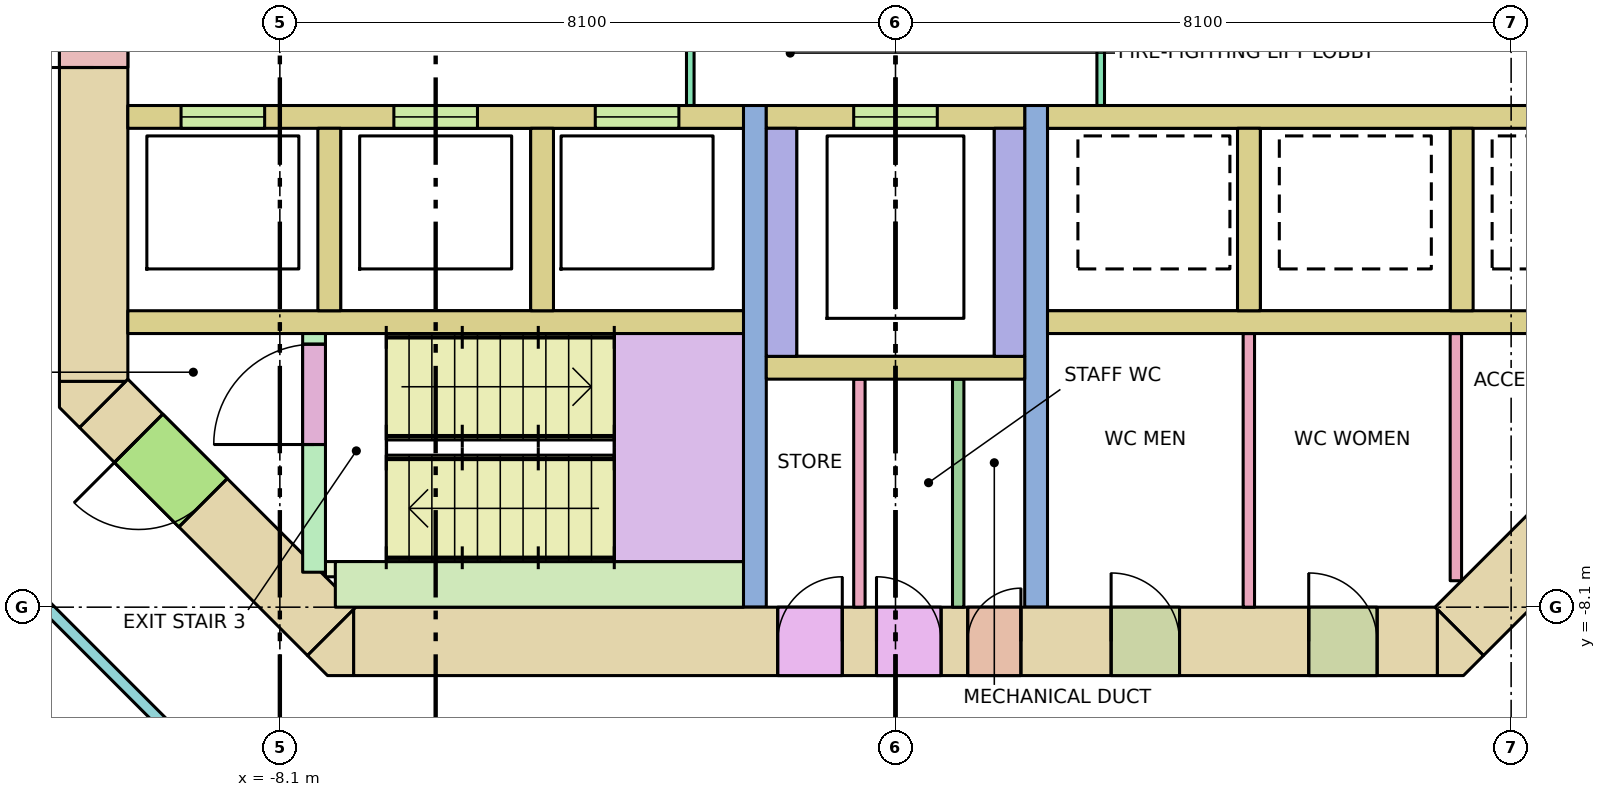
"""IFC4 building model, lengths in metres.
Left out: names, types, materials, properties, quantities, classifications, styles, units other than length and angle.
Written with IfcOpenShell. Run it as: python <this file> out.ifc"""

import sys

from ifc_helpers import new_model, si_unit, direction, frame, frame_2d, origin, place, context, subcontext, project, spatial, polyline, rectangle, outline, extrude, element, fill, save


model = new_model("IFC4")
c1 = context("Model", 3, precision=1e-05, world=origin(), true_north=direction((0.0, 1.0)))
c2 = subcontext(c1, "Body", "Model", "MODEL_VIEW")
j1 = project(units=[si_unit("LENGTHUNIT", "METRE"), si_unit("PLANEANGLEUNIT", "RADIAN")], contexts=[c1])
p1 = place(None, origin())
s1 = spatial("IfcSite", under=j1, at=p1, CompositionType="ELEMENT")
p2 = place(p1, origin())
s2 = spatial("IfcBuilding", under=s1, at=p2, CompositionType="ELEMENT")
p3 = place(p2, frame((0.0, 0.0, 116.2)))
s3 = spatial("IfcBuildingStorey", under=s2, at=p3, CompositionType="ELEMENT", Elevation=116.2)
p4 = place(p3, frame((-7.13, -8.55, -0.28), z_axis=(0.0, 0.0, 1.0), x_axis=(1.0, 0.0, 0.0)))
e1 = element("IfcWall", 1, at=p4, inside=s3, PredefinedType="SHEAR", context=c2, shape_type="SweptSolid", body=[
    extrude(rectangle(XDim=14.26, YDim=0.9, at=frame_2d((7.13, 0.0))), origin(), (0.0, 0.0, 1.0), 3.8),
])
p5 = place(p4, frame((8.08, 0.0, 0.28)))
e2 = element("IfcOpeningElement", 2, at=p5, cuts=e1, PredefinedType="OPENING", context=c2, shape_type="SweptSolid", body=[
    extrude(rectangle(XDim=0.7, YDim=2.1, at=frame_2d((0.35, 1.05))), frame((0.0, 0.46, 0.0), z_axis=(0.0, -1.0, 0.0), x_axis=(1.0, 0.0, 0.0)), (0.0, 0.0, 1.0), 0.92),
])
p6 = place(p4, frame((5.58, 0.0, 0.28)))
e3 = element("IfcOpeningElement", 3, at=p6, cuts=e1, PredefinedType="OPENING", context=c2, shape_type="SweptSolid", body=[
    extrude(rectangle(XDim=0.85, YDim=2.1, at=frame_2d((0.425, 1.05))), frame((0.0, 0.46, 0.0), z_axis=(0.0, -1.0, 0.0), x_axis=(1.0, 0.0, 0.0)), (0.0, 0.0, 1.0), 0.92),
])
p7 = place(p4, frame((6.88, 0.0, 0.28)))
e4 = element("IfcOpeningElement", 4, at=p7, cuts=e1, PredefinedType="OPENING", context=c2, shape_type="SweptSolid", body=[
    extrude(rectangle(XDim=0.85, YDim=2.1, at=frame_2d((0.425, 1.05))), frame((0.0, 0.46, 0.0), z_axis=(0.0, -1.0, 0.0), x_axis=(1.0, 0.0, 0.0)), (0.0, 0.0, 1.0), 0.92),
])
p8 = place(p4, frame((9.967, 0.0, 0.28)))
e5 = element("IfcOpeningElement", 5, at=p8, cuts=e1, PredefinedType="OPENING", context=c2, shape_type="SweptSolid", body=[
    extrude(rectangle(XDim=0.9, YDim=2.1, at=frame_2d((0.45, 1.05))), frame((0.0, 0.46, 0.0), z_axis=(0.0, -1.0, 0.0), x_axis=(1.0, 0.0, 0.0)), (0.0, 0.0, 1.0), 0.92),
])
p9 = place(p4, frame((12.567, 0.0, 0.28)))
e6 = element("IfcOpeningElement", 6, at=p9, cuts=e1, PredefinedType="OPENING", context=c2, shape_type="SweptSolid", body=[
    extrude(rectangle(XDim=0.9, YDim=2.1, at=frame_2d((0.45, 1.05))), frame((0.0, 0.46, 0.0), z_axis=(0.0, -1.0, 0.0), x_axis=(1.0, 0.0, 0.0)), (0.0, 0.0, 1.0), 0.92),
])
p10 = place(p3, frame((-10.55, -5.13, -0.28), z_axis=(0.0, 0.0, 1.0), x_axis=(0.0, 1.0, 0.0)))
e7 = element("IfcWall", 7, at=p10, inside=s3, PredefinedType="SHEAR", context=c2, shape_type="SweptSolid", body=[
    extrude(rectangle(XDim=10.26, YDim=0.9, at=frame_2d((5.13, 0.0))), origin(), (0.0, 0.0, 1.0), 3.8),
])
p11 = place(p10, frame((4.13, 0.0, 0.28)))
e8 = element("IfcOpeningElement", 8, at=p11, cuts=e7, PredefinedType="OPENING", context=c2, shape_type="SweptSolid", body=[
    extrude(rectangle(XDim=2.0, YDim=2.1, at=frame_2d((1.0, 1.05))), frame((0.0, 0.46, 0.0), z_axis=(0.0, -1.0, 0.0), x_axis=(1.0, 0.0, 0.0)), (0.0, 0.0, 1.0), 0.92),
])
p12 = place(p3, frame((10.418, -5.418, -0.28), z_axis=(0.0, 0.0, 1.0), x_axis=(-0.707106781187, -0.707106781187, 0.0)))
e9 = element("IfcWall", 9, at=p12, inside=s3, PredefinedType="SHEAR", context=c2, shape_type="SweptSolid", body=[
    extrude(rectangle(XDim=4.243, YDim=0.9, at=frame_2d((2.121, 0.0))), origin(), (0.0, 0.0, 1.0), 3.8),
])
p13 = place(p12, frame((0.52, 0.0, 0.28)))
e10 = element("IfcOpeningElement", 10, at=p13, cuts=e9, PredefinedType="OPENING", context=c2, shape_type="SweptSolid", body=[
    extrude(rectangle(XDim=0.9, YDim=2.1, at=frame_2d((0.45, 1.05))), frame((0.0, 0.46, 0.0), z_axis=(0.0, -1.0, 0.0), x_axis=(1.0, 0.0, 0.0)), (0.0, 0.0, 1.0), 0.92),
])
p14 = place(p3, frame((-7.418, -8.418, -0.28), z_axis=(0.0, 0.0, 1.0), x_axis=(-0.707106781187, 0.707106781187, 0.0)))
e11 = element("IfcWall", 11, at=p14, inside=s3, PredefinedType="SHEAR", context=c2, shape_type="SweptSolid", body=[
    extrude(rectangle(XDim=4.243, YDim=0.9, at=frame_2d((2.121, 0.0))), origin(), (0.0, 0.0, 1.0), 3.8),
])
p15 = place(p14, frame((2.393, 0.0, 0.28)))
e12 = element("IfcOpeningElement", 12, at=p15, cuts=e11, PredefinedType="OPENING", context=c2, shape_type="SweptSolid", body=[
    extrude(rectangle(XDim=1.2, YDim=2.1, at=frame_2d((0.6, 1.05))), frame((0.0, 0.46, 0.0), z_axis=(0.0, -1.0, 0.0), x_axis=(1.0, 0.0, 0.0)), (0.0, 0.0, 1.0), 0.92),
])
p16 = place(p3, frame((0.0, 0.0, -0.28)))
e13 = element("IfcWall", 13, at=p16, inside=s3, PredefinedType="SHEAR", context=c2, shape_type="SweptSolid", body=[
    extrude(outline(polyline([(-7.473, -9.0), (-7.736, -8.736), (-7.13, -8.13), (-7.13, -9.0), (-7.473, -9.0)])), origin(), (0.0, 0.0, 1.0), 3.8),
])
p17 = place(p3, frame((0.0, 0.0, -0.28)))
e14 = element("IfcWall", 14, at=p17, inside=s3, PredefinedType="SHEAR", context=c2, shape_type="SweptSolid", body=[
    extrude(outline(polyline([(7.473, -9.0), (7.13, -9.0), (7.13, -8.13), (7.736, -8.736), (7.473, -9.0)])), origin(), (0.0, 0.0, 1.0), 3.8),
])
p18 = place(p3, frame((0.0, 0.0, -0.28)))
e15 = element("IfcWall", 15, at=p18, inside=s3, PredefinedType="SHEAR", context=c2, shape_type="SweptSolid", body=[
    extrude(outline(polyline([(-11.0, -5.473), (-11.0, -5.13), (-10.13, -5.13), (-10.736, -5.736), (-11.0, -5.473)])), origin(), (0.0, 0.0, 1.0), 3.8),
])
for number, where, z_axis, x_axis in (
    (16, (-10.1, -4.35, 0.0), (0.0, 0.0, 1.0), (1.0, 0.0, 0.0)),
    (17, (2.0, -4.35, 0.0), (0.0, 0.0, 1.0), (1.0, 0.0, 0.0)),
):
    element("IfcWall", number, at=place(p3, frame(where, z_axis=z_axis, x_axis=x_axis)), inside=s3, PredefinedType="SOLIDWALL", context=c2, shape_type="SweptSolid", body=[
        extrude(rectangle(XDim=8.1, YDim=0.3, at=frame_2d((4.05, 0.0))), origin(), (0.0, 0.0, 1.0), 3.52),
    ])
p19 = place(p3, frame((-10.1, -1.65, 0.0), z_axis=(0.0, 0.0, 1.0), x_axis=(1.0, 0.0, 0.0)))
e18 = element("IfcWall", 18, at=p19, inside=s3, PredefinedType="SOLIDWALL", context=c2, shape_type="SweptSolid", body=[
    extrude(rectangle(XDim=8.1, YDim=0.3, at=frame_2d((4.05, 0.0))), origin(), (0.0, 0.0, 1.0), 3.52),
])
p20 = place(p19, frame((0.7, 0.0, 0.0)))
e19 = element("IfcOpeningElement", 19, at=p20, cuts=e18, PredefinedType="OPENING", context=c2, shape_type="SweptSolid", body=[
    extrude(rectangle(XDim=1.1, YDim=2.1, at=frame_2d((0.55, 1.05))), frame((0.0, 0.16, 0.0), z_axis=(0.0, -1.0, 0.0), x_axis=(1.0, 0.0, 0.0)), (0.0, 0.0, 1.0), 0.32),
])
p21 = place(p19, frame((3.5, 0.0, 0.0)))
e20 = element("IfcOpeningElement", 20, at=p21, cuts=e18, PredefinedType="OPENING", context=c2, shape_type="SweptSolid", body=[
    extrude(rectangle(XDim=1.1, YDim=2.1, at=frame_2d((0.55, 1.05))), frame((0.0, 0.16, 0.0), z_axis=(0.0, -1.0, 0.0), x_axis=(1.0, 0.0, 0.0)), (0.0, 0.0, 1.0), 0.32),
])
p22 = place(p19, frame((6.15, 0.0, 0.0)))
e21 = element("IfcOpeningElement", 21, at=p22, cuts=e18, PredefinedType="OPENING", context=c2, shape_type="SweptSolid", body=[
    extrude(rectangle(XDim=1.1, YDim=2.1, at=frame_2d((0.55, 1.05))), frame((0.0, 0.16, 0.0), z_axis=(0.0, -1.0, 0.0), x_axis=(1.0, 0.0, 0.0)), (0.0, 0.0, 1.0), 0.32),
])
p23 = place(p3, frame((2.0, -1.65, 0.0), z_axis=(0.0, 0.0, 1.0), x_axis=(1.0, 0.0, 0.0)))
e22 = element("IfcWall", 22, at=p23, inside=s3, PredefinedType="SOLIDWALL", context=c2, shape_type="SweptSolid", body=[
    extrude(rectangle(XDim=8.1, YDim=0.3, at=frame_2d((4.05, 0.0))), origin(), (0.0, 0.0, 1.0), 3.52),
])
for number, where, z_axis, x_axis in (
    (23, (-7.45, -4.2, 0.0), (0.0, 0.0, 1.0), (0.0, 1.0, 0.0)),
    (24, (-4.65, -4.2, 0.0), (0.0, 0.0, 1.0), (0.0, 1.0, 0.0)),
    (25, (4.65, -4.2, 0.0), (0.0, 0.0, 1.0), (0.0, 1.0, 0.0)),
    (26, (7.45, -4.2, 0.0), (0.0, 0.0, 1.0), (0.0, 1.0, 0.0)),
):
    element("IfcWall", number, at=place(p3, frame(where, z_axis=z_axis, x_axis=x_axis)), inside=s3, PredefinedType="SOLIDWALL", context=c2, shape_type="SweptSolid", body=[
        extrude(rectangle(XDim=2.4, YDim=0.3, at=frame_2d((1.2, 0.0))), origin(), (0.0, 0.0, 1.0), 3.52),
    ])
for number, where, z_axis, x_axis in (
    (27, (-1.85, -8.1, 0.0), (0.0, 0.0, 1.0), (0.0, 1.0, 0.0)),
    (28, (1.85, -8.1, 0.0), (0.0, 0.0, 1.0), (0.0, 1.0, 0.0)),
):
    element("IfcWall", number, at=place(p3, frame(where, z_axis=z_axis, x_axis=x_axis)), inside=s3, PredefinedType="SHEAR", context=c2, shape_type="SweptSolid", body=[
        extrude(rectangle(XDim=6.6, YDim=0.3, at=frame_2d((3.3, 0.0))), origin(), (0.0, 0.0, 1.0), 3.52),
    ])
p24 = place(p3, frame((-1.7, -1.65, 0.0), z_axis=(0.0, 0.0, 1.0), x_axis=(1.0, 0.0, 0.0)))
e29 = element("IfcWall", 29, at=p24, inside=s3, PredefinedType="SOLIDWALL", context=c2, shape_type="SweptSolid", body=[
    extrude(rectangle(XDim=3.4, YDim=0.3, at=frame_2d((1.7, 0.0))), origin(), (0.0, 0.0, 1.0), 3.52),
])
p25 = place(p24, frame((1.15, 0.0, 0.0)))
e30 = element("IfcOpeningElement", 30, at=p25, cuts=e29, PredefinedType="OPENING", context=c2, shape_type="SweptSolid", body=[
    extrude(rectangle(XDim=1.1, YDim=2.1, at=frame_2d((0.55, 1.05))), frame((0.0, 0.16, 0.0), z_axis=(0.0, -1.0, 0.0), x_axis=(1.0, 0.0, 0.0)), (0.0, 0.0, 1.0), 0.32),
])
for number, where, z_axis, x_axis in (
    (31, (-1.5, -4.8, 0.0), (0.0, 0.0, 1.0), (0.0, 1.0, 0.0)),
    (32, (1.5, -4.8, 0.0), (0.0, 0.0, 1.0), (0.0, 1.0, 0.0)),
):
    element("IfcWall", number, at=place(p3, frame(where, z_axis=z_axis, x_axis=x_axis)), inside=s3, PredefinedType="SOLIDWALL", context=c2, shape_type="SweptSolid", body=[
        extrude(rectangle(XDim=3.0, YDim=0.4, at=frame_2d((1.5, 0.0))), origin(), (0.0, 0.0, 1.0), 3.52),
    ])
p26 = place(p3, frame((-1.7, -4.95, 0.0), z_axis=(0.0, 0.0, 1.0), x_axis=(1.0, 0.0, 0.0)))
e33 = element("IfcWall", 33, at=p26, inside=s3, PredefinedType="SOLIDWALL", context=c2, shape_type="SweptSolid", body=[
    extrude(rectangle(XDim=3.4, YDim=0.3, at=frame_2d((1.7, 0.0))), origin(), (0.0, 0.0, 1.0), 3.52),
])
p27 = place(p3, frame((-7.65, -7.64, 0.0), z_axis=(0.0, 0.0, 1.0), x_axis=(0.0, 1.0, 0.0)))
e34 = element("IfcWall", 34, at=p27, inside=s3, PredefinedType="SHEAR", context=c2, shape_type="SweptSolid", body=[
    extrude(rectangle(XDim=3.14, YDim=0.3, at=frame_2d((1.57, 0.0))), origin(), (0.0, 0.0, 1.0), 3.52),
])
p28 = place(p27, frame((1.68, 0.0, 0.0)))
e35 = element("IfcOpeningElement", 35, at=p28, cuts=e34, PredefinedType="OPENING", context=c2, shape_type="SweptSolid", body=[
    extrude(rectangle(XDim=1.32, YDim=2.1, at=frame_2d((0.66, 1.05))), frame((0.0, 0.16, 0.0), z_axis=(0.0, -1.0, 0.0), x_axis=(1.0, 0.0, 0.0)), (0.0, 0.0, 1.0), 0.32),
])
p29 = place(p3, frame((-7.5, -7.6, 0.0), z_axis=(0.0, 0.0, 1.0), x_axis=(1.0, 0.0, 0.0)))
e36 = element("IfcWall", 36, at=p29, inside=s3, PredefinedType="SHEAR", context=c2, shape_type="SweptSolid", body=[
    extrude(rectangle(XDim=0.6, YDim=0.2, at=frame_2d((0.3, 0.0))), origin(), (0.0, 0.0, 1.0), 3.52),
])
p30 = place(p3, frame((-7.37, -7.8, 0.0), z_axis=(0.0, 0.0, 1.0), x_axis=(1.0, 0.0, 0.0)))
e37 = element("IfcWall", 37, at=p30, inside=s3, PredefinedType="SHEAR", context=c2, shape_type="SweptSolid", body=[
    extrude(rectangle(XDim=5.37, YDim=0.6, at=frame_2d((2.685, 0.0))), origin(), (0.0, 0.0, 1.0), 3.52),
])
p31 = place(p3, frame((-2.7, -1.5, 0.0), z_axis=(0.0, 0.0, 1.0), x_axis=(0.0, 1.0, 0.0)))
e38 = element("IfcWall", 38, at=p31, inside=s3, PredefinedType="PARTITIONING", context=c2, shape_type="SweptSolid", body=[
    extrude(rectangle(XDim=3.0, YDim=0.1, at=frame_2d((1.5, 0.0))), origin(), (0.0, 0.0, 1.0), 3.52),
])
p32 = place(p31, frame((0.9, 0.0, 0.0)))
e39 = element("IfcOpeningElement", 39, at=p32, cuts=e38, PredefinedType="OPENING", context=c2, shape_type="SweptSolid", body=[
    extrude(rectangle(XDim=1.2, YDim=2.1, at=frame_2d((0.6, 1.05))), frame((0.0, 0.06, 0.0), z_axis=(0.0, -1.0, 0.0), x_axis=(1.0, 0.0, 0.0)), (0.0, 0.0, 1.0), 0.12),
])
p33 = place(p3, frame((2.7, -1.5, 0.0), z_axis=(0.0, 0.0, 1.0), x_axis=(0.0, 1.0, 0.0)))
e40 = element("IfcWall", 40, at=p33, inside=s3, PredefinedType="PARTITIONING", context=c2, shape_type="SweptSolid", body=[
    extrude(rectangle(XDim=3.0, YDim=0.1, at=frame_2d((1.5, 0.0))), origin(), (0.0, 0.0, 1.0), 3.52),
])
p34 = place(p33, frame((0.9, 0.0, 0.0)))
e41 = element("IfcOpeningElement", 41, at=p34, cuts=e40, PredefinedType="OPENING", context=c2, shape_type="SweptSolid", body=[
    extrude(rectangle(XDim=1.2, YDim=2.1, at=frame_2d((0.6, 1.05))), frame((0.0, 0.06, 0.0), z_axis=(0.0, -1.0, 0.0), x_axis=(1.0, 0.0, 0.0)), (0.0, 0.0, 1.0), 0.12),
])
for number, where, z_axis, x_axis in (
    (42, (0.825, -8.1, 0.0), (0.0, 0.0, 1.0), (0.0, 1.0, 0.0)),
    (43, (-0.475, -8.1, 0.0), (0.0, 0.0, 1.0), (0.0, 1.0, 0.0)),
):
    element("IfcWall", number, at=place(p3, frame(where, z_axis=z_axis, x_axis=x_axis)), inside=s3, PredefinedType="PARTITIONING", context=c2, shape_type="SweptSolid", body=[
        extrude(rectangle(XDim=3.0, YDim=0.15, at=frame_2d((1.5, 0.0))), origin(), (0.0, 0.0, 1.0), 3.52),
    ])
p35 = place(p3, frame((4.649, -8.1, 0.0), z_axis=(0.0, 0.0, 1.0), x_axis=(0.0, 1.0, 0.0)))
e44 = element("IfcWall", 44, at=p35, inside=s3, PredefinedType="PARTITIONING", context=c2, shape_type="SweptSolid", body=[
    extrude(rectangle(XDim=3.6, YDim=0.15, at=frame_2d((1.8, 0.0))), origin(), (0.0, 0.0, 1.0), 3.52),
])
p36 = place(p3, frame((7.373, -7.752, 0.0), z_axis=(0.0, 0.0, 1.0), x_axis=(0.0, 1.0, 0.0)))
e45 = element("IfcWall", 45, at=p36, inside=s3, PredefinedType="PARTITIONING", context=c2, shape_type="SweptSolid", body=[
    extrude(rectangle(XDim=3.252, YDim=0.15, at=frame_2d((1.626, 0.0))), origin(), (0.0, 0.0, 1.0), 3.52),
])
p37 = place(p3, frame((-8.328, -10.938, 0.0), z_axis=(0.0, 0.0, 1.0), x_axis=(-0.707077584218, 0.707135976949, 0.0)))
e46 = element("IfcWall", 46, at=p37, inside=s3, PredefinedType="PARTITIONING", context=c2, shape_type="SweptSolid", body=[
    extrude(rectangle(XDim=4.181, YDim=0.15, at=frame_2d((2.09, 0.0))), origin(), (0.0, 0.0, 1.0), 2.67),
])
p38 = place(p20, origin())
e47 = element("IfcDoor", 47, at=p38, inside=s3, OperationType="DOUBLE_DOOR_SLIDING", PredefinedType="DOOR", context=c2, shape_type="SweptSolid", body=[
    extrude(rectangle(XDim=1.1, YDim=2.1, at=frame_2d((0.55, 1.05))), frame((0.0, 0.025, 0.0), z_axis=(0.0, -1.0, 0.0), x_axis=(1.0, 0.0, 0.0)), (0.0, 0.0, 1.0), 0.05),
])
fill(e19, e47)
p39 = place(p21, origin())
e48 = element("IfcDoor", 48, at=p39, inside=s3, OperationType="DOUBLE_DOOR_SLIDING", PredefinedType="DOOR", context=c2, shape_type="SweptSolid", body=[
    extrude(rectangle(XDim=1.1, YDim=2.1, at=frame_2d((0.55, 1.05))), frame((0.0, 0.025, 0.0), z_axis=(0.0, -1.0, 0.0), x_axis=(1.0, 0.0, 0.0)), (0.0, 0.0, 1.0), 0.05),
])
fill(e20, e48)
p40 = place(p22, origin())
e49 = element("IfcDoor", 49, at=p40, inside=s3, OperationType="DOUBLE_DOOR_SLIDING", PredefinedType="DOOR", context=c2, shape_type="SweptSolid", body=[
    extrude(rectangle(XDim=1.1, YDim=2.1, at=frame_2d((0.55, 1.05))), frame((0.0, 0.025, 0.0), z_axis=(0.0, -1.0, 0.0), x_axis=(1.0, 0.0, 0.0)), (0.0, 0.0, 1.0), 0.05),
])
fill(e21, e49)
p41 = place(p25, origin())
e50 = element("IfcDoor", 50, at=p41, inside=s3, OperationType="DOUBLE_DOOR_SLIDING", PredefinedType="DOOR", context=c2, shape_type="SweptSolid", body=[
    extrude(rectangle(XDim=1.1, YDim=2.1, at=frame_2d((0.55, 1.05))), frame((0.0, 0.025, 0.0), z_axis=(0.0, -1.0, 0.0), x_axis=(1.0, 0.0, 0.0)), (0.0, 0.0, 1.0), 0.05),
])
fill(e30, e50)
p42 = place(p28, origin())
e51 = element("IfcDoor", 51, at=p42, inside=s3, OperationType="DOUBLE_DOOR_SINGLE_SWING", PredefinedType="DOOR", context=c2, shape_type="SweptSolid", body=[
    extrude(rectangle(XDim=1.32, YDim=2.1, at=frame_2d((0.66, 1.05))), frame((0.0, 0.025, 0.0), z_axis=(0.0, -1.0, 0.0), x_axis=(1.0, 0.0, 0.0)), (0.0, 0.0, 1.0), 0.05),
])
fill(e35, e51)
p43 = place(p15, origin())
e52 = element("IfcDoor", 52, at=p43, inside=s3, OperationType="SINGLE_SWING_RIGHT", PredefinedType="DOOR", context=c2, shape_type="SweptSolid", body=[
    extrude(rectangle(XDim=1.2, YDim=2.1, at=frame_2d((0.6, 1.05))), frame((0.0, 0.025, 0.0), z_axis=(0.0, -1.0, 0.0), x_axis=(1.0, 0.0, 0.0)), (0.0, 0.0, 1.0), 0.05),
])
fill(e12, e52)
p44 = place(p11, origin())
e53 = element("IfcDoor", 53, at=p44, inside=s3, OperationType="DOUBLE_DOOR_SINGLE_SWING", PredefinedType="DOOR", context=c2, shape_type="SweptSolid", body=[
    extrude(rectangle(XDim=2.0, YDim=2.1, at=frame_2d((1.0, 1.05))), frame((0.0, 0.025, 0.0), z_axis=(0.0, -1.0, 0.0), x_axis=(1.0, 0.0, 0.0)), (0.0, 0.0, 1.0), 0.05),
])
fill(e8, e53)
p45 = place(p5, origin())
e54 = element("IfcDoor", 54, at=p45, inside=s3, OperationType="SINGLE_SWING_RIGHT", PredefinedType="DOOR", context=c2, shape_type="SweptSolid", body=[
    extrude(rectangle(XDim=0.7, YDim=2.1, at=frame_2d((0.35, 1.05))), frame((0.0, 0.025, 0.0), z_axis=(0.0, -1.0, 0.0), x_axis=(1.0, 0.0, 0.0)), (0.0, 0.0, 1.0), 0.05),
])
fill(e2, e54)
p46 = place(p6, origin())
e55 = element("IfcDoor", 55, at=p46, inside=s3, OperationType="SINGLE_SWING_RIGHT", PredefinedType="DOOR", context=c2, shape_type="SweptSolid", body=[
    extrude(rectangle(XDim=0.85, YDim=2.1, at=frame_2d((0.425, 1.05))), frame((0.0, 0.025, 0.0), z_axis=(0.0, -1.0, 0.0), x_axis=(1.0, 0.0, 0.0)), (0.0, 0.0, 1.0), 0.05),
])
fill(e3, e55)
p47 = place(p7, origin())
e56 = element("IfcDoor", 56, at=p47, inside=s3, OperationType="SINGLE_SWING_LEFT", PredefinedType="DOOR", context=c2, shape_type="SweptSolid", body=[
    extrude(rectangle(XDim=0.85, YDim=2.1, at=frame_2d((0.425, 1.05))), frame((0.0, 0.025, 0.0), z_axis=(0.0, -1.0, 0.0), x_axis=(1.0, 0.0, 0.0)), (0.0, 0.0, 1.0), 0.05),
])
fill(e4, e56)
p48 = place(p8, origin())
e57 = element("IfcDoor", 57, at=p48, inside=s3, OperationType="SINGLE_SWING_LEFT", PredefinedType="DOOR", context=c2, shape_type="SweptSolid", body=[
    extrude(rectangle(XDim=0.9, YDim=2.1, at=frame_2d((0.45, 1.05))), frame((0.0, 0.025, 0.0), z_axis=(0.0, -1.0, 0.0), x_axis=(1.0, 0.0, 0.0)), (0.0, 0.0, 1.0), 0.05),
])
fill(e5, e57)
p49 = place(p9, origin())
e58 = element("IfcDoor", 58, at=p49, inside=s3, OperationType="SINGLE_SWING_LEFT", PredefinedType="DOOR", context=c2, shape_type="SweptSolid", body=[
    extrude(rectangle(XDim=0.9, YDim=2.1, at=frame_2d((0.45, 1.05))), frame((0.0, 0.025, 0.0), z_axis=(0.0, -1.0, 0.0), x_axis=(1.0, 0.0, 0.0)), (0.0, 0.0, 1.0), 0.05),
])
fill(e6, e58)
save(model, sys.argv[1])
